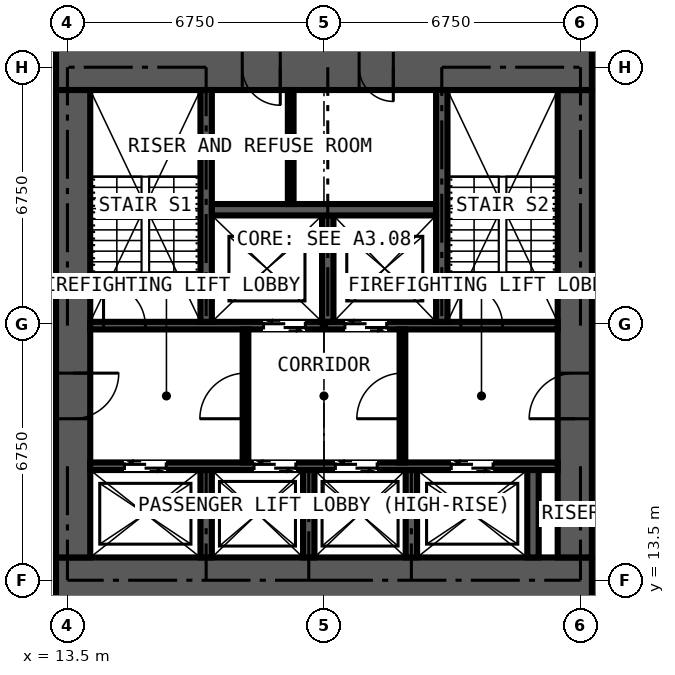
"""IFC4 building model, lengths in metres.
Left out: names, types, materials, properties, quantities, classifications, styles, units other than length and angle.
Written with IfcOpenShell. Run it as: python <this file> out.ifc"""

import sys

from ifc_helpers import new_model, si_unit, direction, frame, frame_2d, origin, place, context, subcontext, project, spatial, rectangle, extrude, element, fill, save


model = new_model("IFC4")
c1 = context("Model", 3, precision=1e-05, world=origin(), true_north=direction((0.0, 1.0)))
c2 = subcontext(c1, "Body", "Model", "MODEL_VIEW")
j1 = project(units=[si_unit("LENGTHUNIT", "METRE"), si_unit("PLANEANGLEUNIT", "RADIAN")], contexts=[c1])
p1 = place(None, origin())
s1 = spatial("IfcSite", under=j1, at=p1, CompositionType="ELEMENT")
p2 = place(p1, origin())
s2 = spatial("IfcBuilding", under=s1, at=p2, CompositionType="ELEMENT")
p3 = place(p2, frame((0.0, 0.0, 240.3)))
s3 = spatial("IfcBuildingStorey", under=s2, at=p3, CompositionType="ELEMENT", Elevation=240.3)
p4 = place(p3, frame((13.2, 13.5, 0.0), z_axis=(0.0, 0.0, 1.0), x_axis=(1.0, 0.0, 0.0)))
e1 = element("IfcWall", 1, at=p4, inside=s3, PredefinedType="SHEAR", context=c2, shape_type="SweptSolid", body=[
    extrude(rectangle(XDim=14.1, YDim=1.2, at=frame_2d((7.05, 0.0))), origin(), (0.0, 0.0, 1.0), 3.6),
])
p5 = place(p3, frame((26.85, 14.1, 0.0), z_axis=(0.0, 0.0, 1.0), x_axis=(0.0, 1.0, 0.0)))
e2 = element("IfcWall", 2, at=p5, inside=s3, PredefinedType="SHEAR", context=c2, shape_type="SweptSolid", body=[
    extrude(rectangle(XDim=12.3, YDim=0.9, at=frame_2d((6.15, 0.0))), origin(), (0.0, 0.0, 1.0), 3.6),
])
p6 = place(p5, frame((3.65, 0.0, 0.0)))
e3 = element("IfcOpeningElement", 3, at=p6, cuts=e2, PredefinedType="OPENING", context=c2, shape_type="SweptSolid", body=[
    extrude(rectangle(XDim=1.2, YDim=2.2, at=frame_2d((0.6, 1.1))), frame((0.0, 0.46, 0.0), z_axis=(0.0, -1.0, 0.0), x_axis=(1.0, 0.0, 0.0)), (0.0, 0.0, 1.0), 0.92),
])
p7 = place(p3, frame((27.3, 27.0, 0.0), z_axis=(0.0, 0.0, 1.0), x_axis=(-1.0, 0.0, 0.0)))
e4 = element("IfcWall", 4, at=p7, inside=s3, PredefinedType="SHEAR", context=c2, shape_type="SweptSolid", body=[
    extrude(rectangle(XDim=14.1, YDim=1.2, at=frame_2d((7.05, 0.0))), origin(), (0.0, 0.0, 1.0), 3.6),
])
p8 = place(p7, frame((5.225, 0.0, 0.0)))
e5 = element("IfcOpeningElement", 5, at=p8, cuts=e4, PredefinedType="OPENING", context=c2, shape_type="SweptSolid", body=[
    extrude(rectangle(XDim=0.9, YDim=2.2, at=frame_2d((0.45, 1.1))), frame((0.0, 0.61, 0.0), z_axis=(0.0, -1.0, 0.0), x_axis=(1.0, 0.0, 0.0)), (0.0, 0.0, 1.0), 1.22),
])
p9 = place(p7, frame((8.2, 0.0, 0.0)))
e6 = element("IfcOpeningElement", 6, at=p9, cuts=e4, PredefinedType="OPENING", context=c2, shape_type="SweptSolid", body=[
    extrude(rectangle(XDim=1.0, YDim=2.2, at=frame_2d((0.5, 1.1))), frame((0.0, 0.61, 0.0), z_axis=(0.0, -1.0, 0.0), x_axis=(1.0, 0.0, 0.0)), (0.0, 0.0, 1.0), 1.22),
])
p10 = place(p3, frame((13.65, 26.4, 0.0), z_axis=(0.0, 0.0, 1.0), x_axis=(0.0, -1.0, 0.0)))
e7 = element("IfcWall", 7, at=p10, inside=s3, PredefinedType="SHEAR", context=c2, shape_type="SweptSolid", body=[
    extrude(rectangle(XDim=12.3, YDim=0.9, at=frame_2d((6.15, 0.0))), origin(), (0.0, 0.0, 1.0), 3.6),
])
p11 = place(p10, frame((7.45, 0.0, 0.0)))
e8 = element("IfcOpeningElement", 8, at=p11, cuts=e7, PredefinedType="OPENING", context=c2, shape_type="SweptSolid", body=[
    extrude(rectangle(XDim=1.2, YDim=2.2, at=frame_2d((0.6, 1.1))), frame((0.0, 0.46, 0.0), z_axis=(0.0, -1.0, 0.0), x_axis=(1.0, 0.0, 0.0)), (0.0, 0.0, 1.0), 0.92),
])
p12 = place(p3, frame((14.1, 16.5, 0.0), z_axis=(0.0, 0.0, 1.0), x_axis=(1.0, 0.0, 0.0)))
e9 = element("IfcWall", 9, at=p12, inside=s3, PredefinedType="SHEAR", context=c2, shape_type="SweptSolid", body=[
    extrude(rectangle(XDim=12.3, YDim=0.2, at=frame_2d((6.15, 0.0))), origin(), (0.0, 0.0, 1.0), 3.6),
])
p13 = place(p12, frame((0.9, 0.0, 0.0)))
e10 = element("IfcOpeningElement", 10, at=p13, cuts=e9, PredefinedType="OPENING", context=c2, shape_type="SweptSolid", body=[
    extrude(rectangle(XDim=1.1, YDim=2.2, at=frame_2d((0.55, 1.1))), frame((0.0, 0.11, 0.0), z_axis=(0.0, -1.0, 0.0), x_axis=(1.0, 0.0, 0.0)), (0.0, 0.0, 1.0), 0.22),
])
p14 = place(p12, frame((4.31, 0.0, 0.0)))
e11 = element("IfcOpeningElement", 11, at=p14, cuts=e9, PredefinedType="OPENING", context=c2, shape_type="SweptSolid", body=[
    extrude(rectangle(XDim=1.1, YDim=2.2, at=frame_2d((0.55, 1.1))), frame((0.0, 0.11, 0.0), z_axis=(0.0, -1.0, 0.0), x_axis=(1.0, 0.0, 0.0)), (0.0, 0.0, 1.0), 0.22),
])
p15 = place(p12, frame((6.45, 0.0, 0.0)))
e12 = element("IfcOpeningElement", 12, at=p15, cuts=e9, PredefinedType="OPENING", context=c2, shape_type="SweptSolid", body=[
    extrude(rectangle(XDim=1.1, YDim=2.2, at=frame_2d((0.55, 1.1))), frame((0.0, 0.11, 0.0), z_axis=(0.0, -1.0, 0.0), x_axis=(1.0, 0.0, 0.0)), (0.0, 0.0, 1.0), 0.22),
])
p16 = place(p12, frame((9.5, 0.0, 0.0)))
e13 = element("IfcOpeningElement", 13, at=p16, cuts=e9, PredefinedType="OPENING", context=c2, shape_type="SweptSolid", body=[
    extrude(rectangle(XDim=1.1, YDim=2.2, at=frame_2d((0.55, 1.1))), frame((0.0, 0.11, 0.0), z_axis=(0.0, -1.0, 0.0), x_axis=(1.0, 0.0, 0.0)), (0.0, 0.0, 1.0), 0.22),
])
p17 = place(p3, frame((14.1, 20.2, 0.0), z_axis=(0.0, 0.0, 1.0), x_axis=(1.0, 0.0, 0.0)))
e14 = element("IfcWall", 14, at=p17, inside=s3, PredefinedType="SHEAR", context=c2, shape_type="SweptSolid", body=[
    extrude(rectangle(XDim=12.3, YDim=0.2, at=frame_2d((6.15, 0.0))), origin(), (0.0, 0.0, 1.0), 3.6),
])
p18 = place(p17, frame((4.56, 0.0, 0.0)))
e15 = element("IfcOpeningElement", 15, at=p18, cuts=e14, PredefinedType="OPENING", context=c2, shape_type="SweptSolid", body=[
    extrude(rectangle(XDim=1.1, YDim=2.2, at=frame_2d((0.55, 1.1))), frame((0.0, 0.11, 0.0), z_axis=(0.0, -1.0, 0.0), x_axis=(1.0, 0.0, 0.0)), (0.0, 0.0, 1.0), 0.22),
])
p19 = place(p17, frame((6.7, 0.0, 0.0)))
e16 = element("IfcOpeningElement", 16, at=p19, cuts=e14, PredefinedType="OPENING", context=c2, shape_type="SweptSolid", body=[
    extrude(rectangle(XDim=1.1, YDim=2.2, at=frame_2d((0.55, 1.1))), frame((0.0, 0.11, 0.0), z_axis=(0.0, -1.0, 0.0), x_axis=(1.0, 0.0, 0.0)), (0.0, 0.0, 1.0), 0.22),
])
p20 = place(p17, frame((0.35, 0.0, 0.0)))
e17 = element("IfcOpeningElement", 17, at=p20, cuts=e14, PredefinedType="OPENING", context=c2, shape_type="SweptSolid", body=[
    extrude(rectangle(XDim=1.1, YDim=2.2, at=frame_2d((0.55, 1.1))), frame((0.0, 0.11, 0.0), z_axis=(0.0, -1.0, 0.0), x_axis=(1.0, 0.0, 0.0)), (0.0, 0.0, 1.0), 0.22),
])
p21 = place(p17, frame((9.75, 0.0, 0.0)))
e18 = element("IfcOpeningElement", 18, at=p21, cuts=e14, PredefinedType="OPENING", context=c2, shape_type="SweptSolid", body=[
    extrude(rectangle(XDim=1.1, YDim=2.2, at=frame_2d((0.55, 1.1))), frame((0.0, 0.11, 0.0), z_axis=(0.0, -1.0, 0.0), x_axis=(1.0, 0.0, 0.0)), (0.0, 0.0, 1.0), 0.22),
])
for number, where, z_axis, x_axis in (
    (19, (17.15, 20.3, 0.0), (0.0, 0.0, 1.0), (0.0, 1.0, 0.0)),
    (20, (23.35, 20.3, 0.0), (0.0, 0.0, 1.0), (0.0, 1.0, 0.0)),
):
    element("IfcWall", number, at=place(p3, frame(where, z_axis=z_axis, x_axis=x_axis)), inside=s3, PredefinedType="SHEAR", context=c2, shape_type="SweptSolid", body=[
        extrude(rectangle(XDim=6.1, YDim=0.3, at=frame_2d((3.05, 0.0))), origin(), (0.0, 0.0, 1.0), 3.6),
    ])
p22 = place(p3, frame((20.35, 20.3, 0.0), z_axis=(0.0, 0.0, 1.0), x_axis=(0.0, 1.0, 0.0)))
e21 = element("IfcWall", 21, at=p22, inside=s3, PredefinedType="SHEAR", context=c2, shape_type="SweptSolid", body=[
    extrude(rectangle(XDim=2.8, YDim=0.3, at=frame_2d((1.4, 0.0))), origin(), (0.0, 0.0, 1.0), 3.6),
])
p23 = place(p3, frame((17.3, 23.25, 0.0), z_axis=(0.0, 0.0, 1.0), x_axis=(1.0, 0.0, 0.0)))
e22 = element("IfcWall", 22, at=p23, inside=s3, PredefinedType="SHEAR", context=c2, shape_type="SweptSolid", body=[
    extrude(rectangle(XDim=5.9, YDim=0.3, at=frame_2d((2.95, 0.0))), origin(), (0.0, 0.0, 1.0), 3.6),
])
for number, where, z_axis, x_axis in (
    (23, (17.15, 14.1, 0.0), (0.0, 0.0, 1.0), (0.0, 1.0, 0.0)),
    (24, (19.85, 14.1, 0.0), (0.0, 0.0, 1.0), (0.0, 1.0, 0.0)),
    (25, (22.55, 14.1, 0.0), (0.0, 0.0, 1.0), (0.0, 1.0, 0.0)),
    (26, (25.75, 14.1, 0.0), (0.0, 0.0, 1.0), (0.0, 1.0, 0.0)),
):
    element("IfcWall", number, at=place(p3, frame(where, z_axis=z_axis, x_axis=x_axis)), inside=s3, PredefinedType="SHEAR", context=c2, shape_type="SweptSolid", body=[
        extrude(rectangle(XDim=2.3, YDim=0.3, at=frame_2d((1.15, 0.0))), origin(), (0.0, 0.0, 1.0), 3.6),
    ])
p24 = place(p3, frame((18.185, 16.6, 0.0), z_axis=(0.0, 0.0, 1.0), x_axis=(0.0, 1.0, 0.0)))
e27 = element("IfcWall", 27, at=p24, inside=s3, PredefinedType="PARTITIONING", context=c2, shape_type="SweptSolid", body=[
    extrude(rectangle(XDim=3.5, YDim=0.15, at=frame_2d((1.75, 0.0))), origin(), (0.0, 0.0, 1.0), 3.375),
])
p25 = place(p24, frame((1.15, 0.0, 0.0)))
e28 = element("IfcOpeningElement", 28, at=p25, cuts=e27, PredefinedType="OPENING", context=c2, shape_type="SweptSolid", body=[
    extrude(rectangle(XDim=1.2, YDim=2.2, at=frame_2d((0.6, 1.1))), frame((0.0, 0.085, 0.0), z_axis=(0.0, -1.0, 0.0), x_axis=(1.0, 0.0, 0.0)), (0.0, 0.0, 1.0), 0.17),
])
p26 = place(p3, frame((22.315, 16.6, 0.0), z_axis=(0.0, 0.0, 1.0), x_axis=(0.0, 1.0, 0.0)))
e29 = element("IfcWall", 29, at=p26, inside=s3, PredefinedType="PARTITIONING", context=c2, shape_type="SweptSolid", body=[
    extrude(rectangle(XDim=3.5, YDim=0.15, at=frame_2d((1.75, 0.0))), origin(), (0.0, 0.0, 1.0), 3.375),
])
p27 = place(p26, frame((1.15, 0.0, 0.0)))
e30 = element("IfcOpeningElement", 30, at=p27, cuts=e29, PredefinedType="OPENING", context=c2, shape_type="SweptSolid", body=[
    extrude(rectangle(XDim=1.2, YDim=2.2, at=frame_2d((0.6, 1.1))), frame((0.0, 0.085, 0.0), z_axis=(0.0, -1.0, 0.0), x_axis=(1.0, 0.0, 0.0)), (0.0, 0.0, 1.0), 0.17),
])
p28 = place(p3, frame((19.375, 23.4, 0.0), z_axis=(0.0, 0.0, 1.0), x_axis=(0.0, 1.0, 0.0)))
e31 = element("IfcWall", 31, at=p28, inside=s3, PredefinedType="PARTITIONING", context=c2, shape_type="SweptSolid", body=[
    extrude(rectangle(XDim=3.0, YDim=0.15, at=frame_2d((1.5, 0.0))), origin(), (0.0, 0.0, 1.0), 3.375),
])
p29 = place(p13, origin())
e32 = element("IfcDoor", 32, at=p29, inside=s3, OperationType="DOUBLE_DOOR_SLIDING", PredefinedType="DOOR", context=c2, shape_type="SweptSolid", body=[
    extrude(rectangle(XDim=1.1, YDim=2.2, at=frame_2d((0.55, 1.1))), frame((0.0, 0.025, 0.0), z_axis=(0.0, -1.0, 0.0), x_axis=(1.0, 0.0, 0.0)), (0.0, 0.0, 1.0), 0.05),
])
fill(e10, e32)
p30 = place(p14, origin())
e33 = element("IfcDoor", 33, at=p30, inside=s3, OperationType="DOUBLE_DOOR_SLIDING", PredefinedType="DOOR", context=c2, shape_type="SweptSolid", body=[
    extrude(rectangle(XDim=1.1, YDim=2.2, at=frame_2d((0.55, 1.1))), frame((0.0, 0.025, 0.0), z_axis=(0.0, -1.0, 0.0), x_axis=(1.0, 0.0, 0.0)), (0.0, 0.0, 1.0), 0.05),
])
fill(e11, e33)
p31 = place(p15, origin())
e34 = element("IfcDoor", 34, at=p31, inside=s3, OperationType="DOUBLE_DOOR_SLIDING", PredefinedType="DOOR", context=c2, shape_type="SweptSolid", body=[
    extrude(rectangle(XDim=1.1, YDim=2.2, at=frame_2d((0.55, 1.1))), frame((0.0, 0.025, 0.0), z_axis=(0.0, -1.0, 0.0), x_axis=(1.0, 0.0, 0.0)), (0.0, 0.0, 1.0), 0.05),
])
fill(e12, e34)
p32 = place(p16, origin())
e35 = element("IfcDoor", 35, at=p32, inside=s3, OperationType="DOUBLE_DOOR_SLIDING", PredefinedType="DOOR", context=c2, shape_type="SweptSolid", body=[
    extrude(rectangle(XDim=1.1, YDim=2.2, at=frame_2d((0.55, 1.1))), frame((0.0, 0.025, 0.0), z_axis=(0.0, -1.0, 0.0), x_axis=(1.0, 0.0, 0.0)), (0.0, 0.0, 1.0), 0.05),
])
fill(e13, e35)
p33 = place(p18, origin())
e36 = element("IfcDoor", 36, at=p33, inside=s3, OperationType="DOUBLE_DOOR_SLIDING", PredefinedType="DOOR", context=c2, shape_type="SweptSolid", body=[
    extrude(rectangle(XDim=1.1, YDim=2.2, at=frame_2d((0.55, 1.1))), frame((0.0, 0.025, 0.0), z_axis=(0.0, -1.0, 0.0), x_axis=(1.0, 0.0, 0.0)), (0.0, 0.0, 1.0), 0.05),
])
fill(e15, e36)
p34 = place(p19, origin())
e37 = element("IfcDoor", 37, at=p34, inside=s3, OperationType="DOUBLE_DOOR_SLIDING", PredefinedType="DOOR", context=c2, shape_type="SweptSolid", body=[
    extrude(rectangle(XDim=1.1, YDim=2.2, at=frame_2d((0.55, 1.1))), frame((0.0, 0.025, 0.0), z_axis=(0.0, -1.0, 0.0), x_axis=(1.0, 0.0, 0.0)), (0.0, 0.0, 1.0), 0.05),
])
fill(e16, e37)
p35 = place(p11, origin())
e38 = element("IfcDoor", 38, at=p35, inside=s3, OperationType="DOUBLE_DOOR_SINGLE_SWING", PredefinedType="DOOR", context=c2, shape_type="SweptSolid", body=[
    extrude(rectangle(XDim=1.2, YDim=2.2, at=frame_2d((0.6, 1.1))), frame((0.0, 0.025, 0.0), z_axis=(0.0, -1.0, 0.0), x_axis=(1.0, 0.0, 0.0)), (0.0, 0.0, 1.0), 0.05),
])
fill(e8, e38)
p36 = place(p6, origin())
e39 = element("IfcDoor", 39, at=p36, inside=s3, OperationType="DOUBLE_DOOR_SINGLE_SWING", PredefinedType="DOOR", context=c2, shape_type="SweptSolid", body=[
    extrude(rectangle(XDim=1.2, YDim=2.2, at=frame_2d((0.6, 1.1))), frame((0.0, 0.025, 0.0), z_axis=(0.0, -1.0, 0.0), x_axis=(1.0, 0.0, 0.0)), (0.0, 0.0, 1.0), 0.05),
])
fill(e3, e39)
p37 = place(p25, origin())
e40 = element("IfcDoor", 40, at=p37, inside=s3, OperationType="DOUBLE_DOOR_SINGLE_SWING", PredefinedType="DOOR", context=c2, shape_type="SweptSolid", body=[
    extrude(rectangle(XDim=1.2, YDim=2.2, at=frame_2d((0.6, 1.1))), frame((0.0, 0.025, 0.0), z_axis=(0.0, -1.0, 0.0), x_axis=(1.0, 0.0, 0.0)), (0.0, 0.0, 1.0), 0.05),
])
fill(e28, e40)
p38 = place(p27, origin())
e41 = element("IfcDoor", 41, at=p38, inside=s3, OperationType="DOUBLE_DOOR_SINGLE_SWING", PredefinedType="DOOR", context=c2, shape_type="SweptSolid", body=[
    extrude(rectangle(XDim=1.2, YDim=2.2, at=frame_2d((0.6, 1.1))), frame((0.0, 0.025, 0.0), z_axis=(0.0, -1.0, 0.0), x_axis=(1.0, 0.0, 0.0)), (0.0, 0.0, 1.0), 0.05),
])
fill(e30, e41)
p39 = place(p8, origin())
e42 = element("IfcDoor", 42, at=p39, inside=s3, OperationType="SINGLE_SWING_LEFT", PredefinedType="DOOR", context=c2, shape_type="SweptSolid", body=[
    extrude(rectangle(XDim=0.9, YDim=2.2, at=frame_2d((0.45, 1.1))), frame((0.0, 0.4, 0.0), z_axis=(0.0, -1.0, 0.0), x_axis=(1.0, 0.0, 0.0)), (0.0, 0.0, 1.0), 0.8),
])
fill(e5, e42)
p40 = place(p9, origin())
e43 = element("IfcDoor", 43, at=p40, inside=s3, OperationType="SINGLE_SWING_LEFT", PredefinedType="DOOR", context=c2, shape_type="SweptSolid", body=[
    extrude(rectangle(XDim=1.0, YDim=2.2, at=frame_2d((0.5, 1.1))), frame((0.0, 0.025, 0.0), z_axis=(0.0, -1.0, 0.0), x_axis=(1.0, 0.0, 0.0)), (0.0, 0.0, 1.0), 0.05),
])
fill(e6, e43)
p41 = place(p20, origin())
e44 = element("IfcDoor", 44, at=p41, inside=s3, OperationType="SINGLE_SWING_LEFT", PredefinedType="DOOR", context=c2, shape_type="SweptSolid", body=[
    extrude(rectangle(XDim=1.1, YDim=2.2, at=frame_2d((0.55, 1.1))), frame((0.0, 0.025, 0.0), z_axis=(0.0, -1.0, 0.0), x_axis=(1.0, 0.0, 0.0)), (0.0, 0.0, 1.0), 0.05),
])
fill(e17, e44)
p42 = place(p21, origin())
e45 = element("IfcDoor", 45, at=p42, inside=s3, OperationType="SINGLE_SWING_LEFT", PredefinedType="DOOR", context=c2, shape_type="SweptSolid", body=[
    extrude(rectangle(XDim=1.1, YDim=2.2, at=frame_2d((0.55, 1.1))), frame((0.0, 0.025, 0.0), z_axis=(0.0, -1.0, 0.0), x_axis=(1.0, 0.0, 0.0)), (0.0, 0.0, 1.0), 0.05),
])
fill(e18, e45)
save(model, sys.argv[1])
